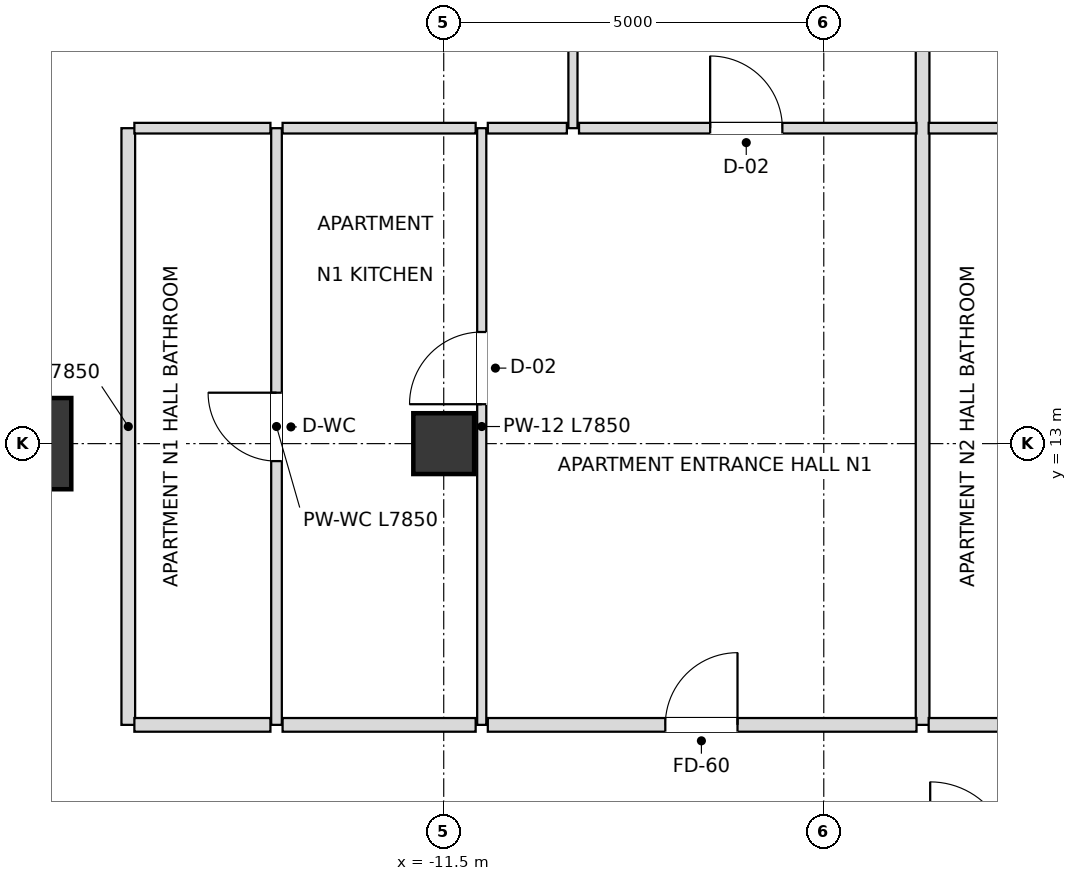
"""IFC4 building model, lengths in metres.
Left out: names, types, materials, properties, quantities, classifications, styles, units other than length and angle.
Written with IfcOpenShell. Run it as: python <this file> out.ifc"""

import sys

from ifc_helpers import new_model, si_unit, direction, frame, frame_2d, origin, origin_2d, place, context, subcontext, project, spatial, rectangle, extrude, element, fill, save


model = new_model("IFC4")
c1 = context("Model", 3, precision=1e-05, world=origin(), true_north=direction((0.0, 1.0)))
c2 = subcontext(c1, "Body", "Model", "MODEL_VIEW")
j1 = project(units=[si_unit("LENGTHUNIT", "METRE"), si_unit("PLANEANGLEUNIT", "RADIAN")], contexts=[c1])
p1 = place(None, origin())
s1 = spatial("IfcSite", under=j1, at=p1, CompositionType="ELEMENT")
p2 = place(p1, origin())
s2 = spatial("IfcBuilding", under=s1, at=p2, CompositionType="ELEMENT")
p3 = place(p2, frame((0.0, 0.0, 106.2)))
s3 = spatial("IfcBuildingStorey", under=s2, at=p3, CompositionType="ELEMENT", Elevation=106.2)
p4 = place(p3, frame((-17.0, 13.0, 0.0), z_axis=(0.0, 0.0, 1.0), x_axis=(1.0, 0.0, 0.0)))
e1 = element("IfcColumn", 1, at=p4, inside=s3, PredefinedType="USERDEFINED", context=c2, shape_type="SweptSolid", body=[
    extrude(rectangle(XDim=1.2, YDim=1.2, at=origin_2d()), origin(), (0.0, 0.0, 1.0), 3.6),
])
p5 = place(p3, frame((-11.5, 13.0, 0.0), z_axis=(0.0, 0.0, 1.0), x_axis=(1.0, 0.0, 0.0)))
e2 = element("IfcColumn", 2, at=p5, inside=s3, PredefinedType="COLUMN", context=c2, shape_type="SweptSolid", body=[
    extrude(rectangle(XDim=0.8, YDim=0.8, at=origin_2d()), origin(), (0.0, 0.0, 1.0), 3.6),
])
p6 = place(p3, frame((-15.65, 9.3, 0.0), z_axis=(0.0, 0.0, 1.0), x_axis=(0.0, 1.0, 0.0)))
e3 = element("IfcWall", 3, at=p6, inside=s3, PredefinedType="PARTITIONING", context=c2, shape_type="SweptSolid", body=[
    extrude(rectangle(XDim=7.85, YDim=0.18, at=frame_2d((3.925, 0.0))), origin(), (0.0, 0.0, 1.0), 2.736),
])
p7 = place(p3, frame((-13.7, 9.3, 0.0), z_axis=(0.0, 0.0, 1.0), x_axis=(0.0, 1.0, 0.0)))
e4 = element("IfcWall", 4, at=p7, inside=s3, PredefinedType="PARTITIONING", context=c2, shape_type="SweptSolid", body=[
    extrude(rectangle(XDim=7.85, YDim=0.14, at=frame_2d((3.925, 0.0))), origin(), (0.0, 0.0, 1.0), 2.736),
])
p8 = place(p7, frame((3.47, 0.0, 0.0)))
e5 = element("IfcOpeningElement", 5, at=p8, cuts=e4, PredefinedType="OPENING", context=c2, shape_type="SweptSolid", body=[
    extrude(rectangle(XDim=0.9, YDim=2.1, at=frame_2d((0.45, 1.05))), frame((0.0, 0.08, 0.0), z_axis=(0.0, -1.0, 0.0), x_axis=(1.0, 0.0, 0.0)), (0.0, 0.0, 1.0), 0.16),
])
p9 = place(p3, frame((-11.0, 9.3, 0.0), z_axis=(0.0, 0.0, 1.0), x_axis=(0.0, 1.0, 0.0)))
e6 = element("IfcWall", 6, at=p9, inside=s3, PredefinedType="PARTITIONING", context=c2, shape_type="SweptSolid", body=[
    extrude(rectangle(XDim=7.85, YDim=0.12, at=frame_2d((3.925, 0.0))), origin(), (0.0, 0.0, 1.0), 2.816),
])
p10 = place(p9, frame((4.219, 0.0, 0.0)))
e7 = element("IfcOpeningElement", 7, at=p10, cuts=e6, PredefinedType="OPENING", context=c2, shape_type="SweptSolid", body=[
    extrude(rectangle(XDim=0.95, YDim=2.1, at=frame_2d((0.475, 1.05))), frame((0.0, 0.07, 0.0), z_axis=(0.0, -1.0, 0.0), x_axis=(1.0, 0.0, 0.0)), (0.0, 0.0, 1.0), 0.14),
])
p11 = place(p3, frame((-9.8, 17.15, 0.0), z_axis=(0.0, 0.0, 1.0), x_axis=(0.0, 1.0, 0.0)))
e8 = element("IfcWall", 8, at=p11, inside=s3, PredefinedType="PARTITIONING", context=c2, shape_type="SweptSolid", body=[
    extrude(rectangle(XDim=6.0, YDim=0.12, at=frame_2d((3.0, 0.0))), origin(), (0.0, 0.0, 1.0), 2.816),
])
p12 = place(p11, frame((3.701, 0.0, 0.0)))
e9 = element("IfcOpeningElement", 9, at=p12, cuts=e8, PredefinedType="OPENING", context=c2, shape_type="SweptSolid", body=[
    extrude(rectangle(XDim=0.9, YDim=2.1, at=frame_2d((0.45, 1.05))), frame((0.0, 0.07, 0.0), z_axis=(0.0, -1.0, 0.0), x_axis=(1.0, 0.0, 0.0)), (0.0, 0.0, 1.0), 0.14),
])
p13 = place(p3, frame((-5.2, 9.3, 0.0), z_axis=(0.0, 0.0, 1.0), x_axis=(0.0, 1.0, 0.0)))
e10 = element("IfcWall", 10, at=p13, inside=s3, PredefinedType="PARTITIONING", context=c2, shape_type="SweptSolid", body=[
    extrude(rectangle(XDim=13.85, YDim=0.18, at=frame_2d((6.925, 0.0))), origin(), (0.0, 0.0, 1.0), 2.816),
])
p14 = place(p3, frame((-15.57, 9.3, 0.0), z_axis=(0.0, 0.0, 1.0), x_axis=(1.0, 0.0, 0.0)))
e11 = element("IfcWall", 11, at=p14, inside=s3, PredefinedType="PARTITIONING", context=c2, shape_type="SweptSolid", body=[
    extrude(rectangle(XDim=1.79, YDim=0.18, at=frame_2d((0.895, 0.0))), origin(), (0.0, 0.0, 1.0), 3.38),
])
p15 = place(p3, frame((-13.62, 9.3, 0.0), z_axis=(0.0, 0.0, 1.0), x_axis=(1.0, 0.0, 0.0)))
e12 = element("IfcWall", 12, at=p15, inside=s3, PredefinedType="PARTITIONING", context=c2, shape_type="SweptSolid", body=[
    extrude(rectangle(XDim=2.54, YDim=0.18, at=frame_2d((1.27, 0.0))), origin(), (0.0, 0.0, 1.0), 3.38),
])
p16 = place(p3, frame((-10.92, 9.3, 0.0), z_axis=(0.0, 0.0, 1.0), x_axis=(1.0, 0.0, 0.0)))
e13 = element("IfcWall", 13, at=p16, inside=s3, PredefinedType="PARTITIONING", context=c2, shape_type="SweptSolid", body=[
    extrude(rectangle(XDim=5.64, YDim=0.18, at=frame_2d((2.82, 0.0))), origin(), (0.0, 0.0, 1.0), 2.816),
])
p17 = place(p16, frame((2.335, 0.0, 0.0)))
e14 = element("IfcOpeningElement", 14, at=p17, cuts=e13, PredefinedType="OPENING", context=c2, shape_type="SweptSolid", body=[
    extrude(rectangle(XDim=0.95, YDim=2.15, at=frame_2d((0.475, 1.075))), frame((0.0, 0.1, 0.0), z_axis=(0.0, -1.0, 0.0), x_axis=(1.0, 0.0, 0.0)), (0.0, 0.0, 1.0), 0.2),
])
p18 = place(p3, frame((-5.12, 9.3, 0.0), z_axis=(0.0, 0.0, 1.0), x_axis=(1.0, 0.0, 0.0)))
e15 = element("IfcWall", 15, at=p18, inside=s3, PredefinedType="PARTITIONING", context=c2, shape_type="SweptSolid", body=[
    extrude(rectangle(XDim=1.79, YDim=0.18, at=frame_2d((0.895, 0.0))), origin(), (0.0, 0.0, 1.0), 3.38),
])
p19 = place(p3, frame((-15.57, 17.15, 0.0), z_axis=(0.0, 0.0, 1.0), x_axis=(1.0, 0.0, 0.0)))
e16 = element("IfcWall", 16, at=p19, inside=s3, PredefinedType="PARTITIONING", context=c2, shape_type="SweptSolid", body=[
    extrude(rectangle(XDim=1.79, YDim=0.14, at=frame_2d((0.895, 0.0))), origin(), (0.0, 0.0, 1.0), 2.736),
])
p20 = place(p3, frame((-13.62, 17.15, 0.0), z_axis=(0.0, 0.0, 1.0), x_axis=(1.0, 0.0, 0.0)))
e17 = element("IfcWall", 17, at=p20, inside=s3, PredefinedType="PARTITIONING", context=c2, shape_type="SweptSolid", body=[
    extrude(rectangle(XDim=2.54, YDim=0.14, at=frame_2d((1.27, 0.0))), origin(), (0.0, 0.0, 1.0), 2.736),
])
p21 = place(p3, frame((-10.92, 17.15, 0.0), z_axis=(0.0, 0.0, 1.0), x_axis=(1.0, 0.0, 0.0)))
e18 = element("IfcWall", 18, at=p21, inside=s3, PredefinedType="PARTITIONING", context=c2, shape_type="SweptSolid", body=[
    extrude(rectangle(XDim=1.04, YDim=0.14, at=frame_2d((0.52, 0.0))), origin(), (0.0, 0.0, 1.0), 3.38),
])
p22 = place(p3, frame((-9.72, 17.15, 0.0), z_axis=(0.0, 0.0, 1.0), x_axis=(1.0, 0.0, 0.0)))
e19 = element("IfcWall", 19, at=p22, inside=s3, PredefinedType="PARTITIONING", context=c2, shape_type="SweptSolid", body=[
    extrude(rectangle(XDim=4.44, YDim=0.14, at=frame_2d((2.22, 0.0))), origin(), (0.0, 0.0, 1.0), 2.816),
])
p23 = place(p22, frame((1.725, 0.0, 0.0)))
e20 = element("IfcOpeningElement", 20, at=p23, cuts=e19, PredefinedType="OPENING", context=c2, shape_type="SweptSolid", body=[
    extrude(rectangle(XDim=0.95, YDim=2.1, at=frame_2d((0.475, 1.05))), frame((0.0, 0.08, 0.0), z_axis=(0.0, -1.0, 0.0), x_axis=(1.0, 0.0, 0.0)), (0.0, 0.0, 1.0), 0.16),
])
p24 = place(p3, frame((-5.12, 17.15, 0.0), z_axis=(0.0, 0.0, 1.0), x_axis=(1.0, 0.0, 0.0)))
e21 = element("IfcWall", 21, at=p24, inside=s3, PredefinedType="PARTITIONING", context=c2, shape_type="SweptSolid", body=[
    extrude(rectangle(XDim=1.79, YDim=0.14, at=frame_2d((0.895, 0.0))), origin(), (0.0, 0.0, 1.0), 3.38),
])
p25 = place(p17, origin())
e22 = element("IfcDoor", 22, at=p25, inside=s3, OperationType="SINGLE_SWING_RIGHT", PredefinedType="DOOR", context=c2, shape_type="SweptSolid", body=[
    extrude(rectangle(XDim=0.95, YDim=2.15, at=frame_2d((0.475, 1.075))), frame((0.0, 0.025, 0.0), z_axis=(0.0, -1.0, 0.0), x_axis=(1.0, 0.0, 0.0)), (0.0, 0.0, 1.0), 0.05),
])
fill(e14, e22)
p26 = place(p10, origin())
e23 = element("IfcDoor", 23, at=p26, inside=s3, OperationType="SINGLE_SWING_LEFT", PredefinedType="DOOR", context=c2, shape_type="SweptSolid", body=[
    extrude(rectangle(XDim=0.95, YDim=2.1, at=frame_2d((0.475, 1.05))), frame((0.0, 0.025, 0.0), z_axis=(0.0, -1.0, 0.0), x_axis=(1.0, 0.0, 0.0)), (0.0, 0.0, 1.0), 0.05),
])
fill(e7, e23)
p27 = place(p8, origin())
e24 = element("IfcDoor", 24, at=p27, inside=s3, OperationType="SINGLE_SWING_RIGHT", PredefinedType="DOOR", context=c2, shape_type="SweptSolid", body=[
    extrude(rectangle(XDim=0.9, YDim=2.1, at=frame_2d((0.45, 1.05))), frame((0.0, 0.025, 0.0), z_axis=(0.0, -1.0, 0.0), x_axis=(1.0, 0.0, 0.0)), (0.0, 0.0, 1.0), 0.05),
])
fill(e5, e24)
p28 = place(p23, origin())
e25 = element("IfcDoor", 25, at=p28, inside=s3, OperationType="SINGLE_SWING_LEFT", PredefinedType="DOOR", context=c2, shape_type="SweptSolid", body=[
    extrude(rectangle(XDim=0.95, YDim=2.1, at=frame_2d((0.475, 1.05))), frame((0.0, 0.025, 0.0), z_axis=(0.0, -1.0, 0.0), x_axis=(1.0, 0.0, 0.0)), (0.0, 0.0, 1.0), 0.05),
])
fill(e20, e25)
save(model, sys.argv[1])
